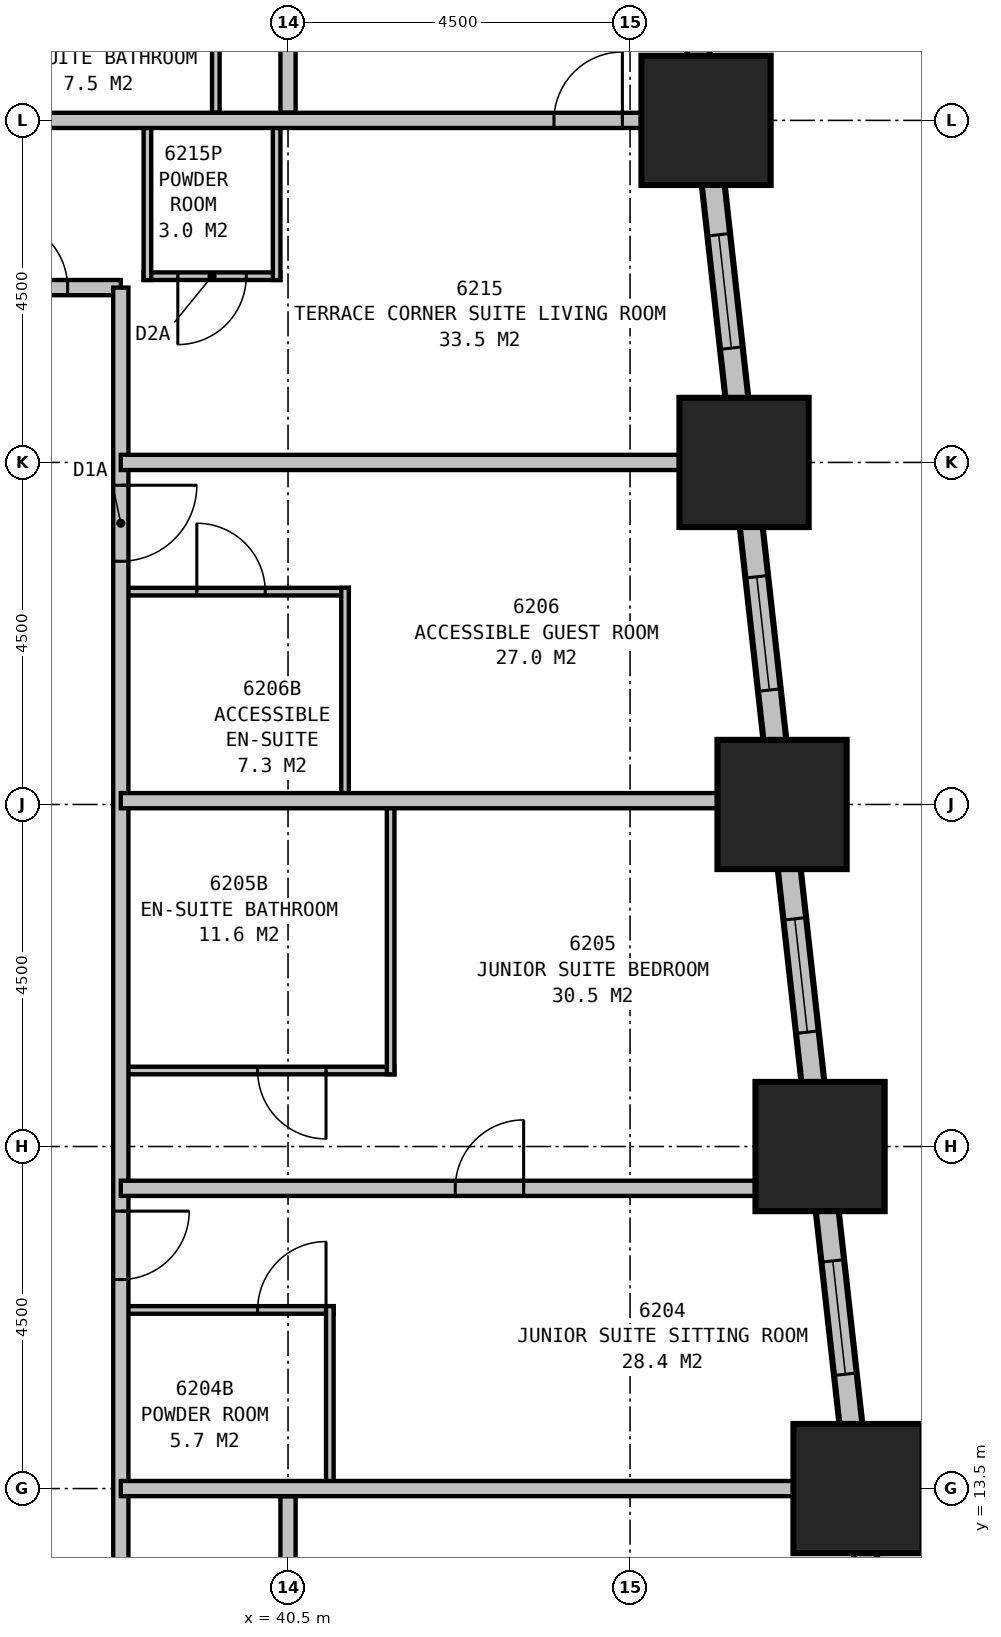
"""IFC4 building model, lengths in metres.
Left out: names, types, materials, properties, quantities, classifications, styles, units other than length and angle.
Written with IfcOpenShell. Run it as: python <this file> out.ifc"""

import sys

from ifc_helpers import new_model, si_unit, direction, frame, frame_2d, origin, origin_2d, place, context, subcontext, project, spatial, rectangle, extrude, element, fill, save


model = new_model("IFC4")
c1 = context("Model", 3, precision=1e-05, world=origin(), true_north=direction((0.0, 1.0)))
c2 = subcontext(c1, "Body", "Model", "MODEL_VIEW")
j1 = project(units=[si_unit("LENGTHUNIT", "METRE"), si_unit("PLANEANGLEUNIT", "RADIAN")], contexts=[c1])
p1 = place(None, origin())
s1 = spatial("IfcSite", under=j1, at=p1, CompositionType="ELEMENT")
p2 = place(p1, origin())
s2 = spatial("IfcBuilding", under=s1, at=p2, CompositionType="ELEMENT")
p3 = place(p2, frame((0.0, 0.0, 240.8)))
s3 = spatial("IfcBuildingStorey", under=s2, at=p3, CompositionType="ELEMENT", Elevation=240.8)
for number, where, z_axis, x_axis in (
    (1, (48.0, 13.5, 0.0), (0.0, 0.0, 1.0), (1.0, 0.0, 0.0)),
    (2, (47.5, 18.0, 0.0), (0.0, 0.0, 1.0), (1.0, 0.0, 0.0)),
    (3, (47.0, 22.5, 0.0), (0.0, 0.0, 1.0), (1.0, 0.0, 0.0)),
    (4, (46.5, 27.0, 0.0), (0.0, 0.0, 1.0), (1.0, 0.0, 0.0)),
    (5, (46.0, 31.5, 0.0), (0.0, 0.0, 1.0), (1.0, 0.0, 0.0)),
):
    element("IfcColumn", number, at=place(p3, frame(where, z_axis=z_axis, x_axis=x_axis)), inside=s3, PredefinedType="COLUMN", context=c2, shape_type="SweptSolid", body=[
        extrude(rectangle(XDim=1.7, YDim=1.7, at=origin_2d()), origin(), (0.0, 0.0, 1.0), 3.9),
    ])
p4 = place(p3, frame((49.017, 4.351, 0.0), z_axis=(0.0, 0.0, 1.0), x_axis=(-0.110433201132, 0.993883548555, 0.0)))
e6 = element("IfcWall", 6, at=p4, inside=s3, PredefinedType="STANDARD", context=c2, shape_type="SweptSolid", body=[
    extrude(rectangle(XDim=31.994, YDim=0.3, at=frame_2d((15.997, 0.0))), origin(), (0.0, 0.0, 1.0), 2.45),
])
p5 = place(p4, frame((1.664, 0.0, 0.5)))
e7 = element("IfcOpeningElement", 7, at=p5, cuts=e6, PredefinedType="OPENING", context=c2, shape_type="SweptSolid", body=[
    extrude(rectangle(XDim=1.5, YDim=1.75, at=frame_2d((0.75, 0.875))), frame((0.0, 0.16, 0.0), z_axis=(0.0, -1.0, 0.0), x_axis=(1.0, 0.0, 0.0)), (0.0, 0.0, 1.0), 0.32),
])
p6 = place(p4, frame((6.192, 0.0, 0.5)))
e8 = element("IfcOpeningElement", 8, at=p6, cuts=e6, PredefinedType="OPENING", context=c2, shape_type="SweptSolid", body=[
    extrude(rectangle(XDim=1.5, YDim=1.75, at=frame_2d((0.75, 0.875))), frame((0.0, 0.16, 0.0), z_axis=(0.0, -1.0, 0.0), x_axis=(1.0, 0.0, 0.0)), (0.0, 0.0, 1.0), 0.32),
])
p7 = place(p4, frame((10.719, 0.0, 0.5)))
e9 = element("IfcOpeningElement", 9, at=p7, cuts=e6, PredefinedType="OPENING", context=c2, shape_type="SweptSolid", body=[
    extrude(rectangle(XDim=1.5, YDim=1.75, at=frame_2d((0.75, 0.875))), frame((0.0, 0.16, 0.0), z_axis=(0.0, -1.0, 0.0), x_axis=(1.0, 0.0, 0.0)), (0.0, 0.0, 1.0), 0.32),
])
p8 = place(p4, frame((15.247, 0.0, 0.5)))
e10 = element("IfcOpeningElement", 10, at=p8, cuts=e6, PredefinedType="OPENING", context=c2, shape_type="SweptSolid", body=[
    extrude(rectangle(XDim=1.5, YDim=1.75, at=frame_2d((0.75, 0.875))), frame((0.0, 0.16, 0.0), z_axis=(0.0, -1.0, 0.0), x_axis=(1.0, 0.0, 0.0)), (0.0, 0.0, 1.0), 0.32),
])
p9 = place(p4, frame((19.775, 0.0, 0.5)))
e11 = element("IfcOpeningElement", 11, at=p9, cuts=e6, PredefinedType="OPENING", context=c2, shape_type="SweptSolid", body=[
    extrude(rectangle(XDim=1.5, YDim=1.75, at=frame_2d((0.75, 0.875))), frame((0.0, 0.16, 0.0), z_axis=(0.0, -1.0, 0.0), x_axis=(1.0, 0.0, 0.0)), (0.0, 0.0, 1.0), 0.32),
])
p10 = place(p4, frame((24.302, 0.0, 0.5)))
e12 = element("IfcOpeningElement", 12, at=p10, cuts=e6, PredefinedType="OPENING", context=c2, shape_type="SweptSolid", body=[
    extrude(rectangle(XDim=1.5, YDim=1.75, at=frame_2d((0.75, 0.875))), frame((0.0, 0.16, 0.0), z_axis=(0.0, -1.0, 0.0), x_axis=(1.0, 0.0, 0.0)), (0.0, 0.0, 1.0), 0.32),
])
p11 = place(p4, frame((28.83, 0.0, 0.5)))
e13 = element("IfcOpeningElement", 13, at=p11, cuts=e6, PredefinedType="OPENING", context=c2, shape_type="SweptSolid", body=[
    extrude(rectangle(XDim=1.5, YDim=1.75, at=frame_2d((0.75, 0.875))), frame((0.0, 0.16, 0.0), z_axis=(0.0, -1.0, 0.0), x_axis=(1.0, 0.0, 0.0)), (0.0, 0.0, 1.0), 0.32),
])
p12 = place(p3, frame((12.406, 29.3, 0.0), z_axis=(0.0, 0.0, 1.0), x_axis=(1.0, 0.0, 0.0)))
e14 = element("IfcWall", 14, at=p12, inside=s3, PredefinedType="PARTITIONING", context=c2, shape_type="SweptSolid", body=[
    extrude(rectangle(XDim=25.894, YDim=0.2, at=frame_2d((12.947, 0.0))), origin(), (0.0, 0.0, 1.0), 3.65),
])
p13 = place(p12, frame((0.9, 0.0, 0.0)))
e15 = element("IfcOpeningElement", 15, at=p13, cuts=e14, PredefinedType="OPENING", context=c2, shape_type="SweptSolid", body=[
    extrude(rectangle(XDim=0.9, YDim=2.1, at=frame_2d((0.45, 1.05))), frame((0.0, 0.11, 0.0), z_axis=(0.0, -1.0, 0.0), x_axis=(1.0, 0.0, 0.0)), (0.0, 0.0, 1.0), 0.22),
])
p14 = place(p12, frame((6.444, 0.0, 0.0)))
e16 = element("IfcOpeningElement", 16, at=p14, cuts=e14, PredefinedType="OPENING", context=c2, shape_type="SweptSolid", body=[
    extrude(rectangle(XDim=0.9, YDim=2.1, at=frame_2d((0.45, 1.05))), frame((0.0, 0.11, 0.0), z_axis=(0.0, -1.0, 0.0), x_axis=(1.0, 0.0, 0.0)), (0.0, 0.0, 1.0), 0.22),
])
p15 = place(p12, frame((14.644, 0.0, 0.0)))
e17 = element("IfcOpeningElement", 17, at=p15, cuts=e14, PredefinedType="OPENING", context=c2, shape_type="SweptSolid", body=[
    extrude(rectangle(XDim=0.9, YDim=2.1, at=frame_2d((0.45, 1.05))), frame((0.0, 0.11, 0.0), z_axis=(0.0, -1.0, 0.0), x_axis=(1.0, 0.0, 0.0)), (0.0, 0.0, 1.0), 0.22),
])
p16 = place(p12, frame((24.293, 0.0, 0.0)))
e18 = element("IfcOpeningElement", 18, at=p16, cuts=e14, PredefinedType="OPENING", context=c2, shape_type="SweptSolid", body=[
    extrude(rectangle(XDim=0.9, YDim=2.1, at=frame_2d((0.45, 1.05))), frame((0.0, 0.11, 0.0), z_axis=(0.0, -1.0, 0.0), x_axis=(1.0, 0.0, 0.0)), (0.0, 0.0, 1.0), 0.22),
])
p17 = place(p3, frame((38.3, 10.6, 0.0), z_axis=(0.0, 0.0, 1.0), x_axis=(0.0, 1.0, 0.0)))
e19 = element("IfcWall", 19, at=p17, inside=s3, PredefinedType="PARTITIONING", context=c2, shape_type="SweptSolid", body=[
    extrude(rectangle(XDim=18.7, YDim=0.2, at=frame_2d((9.35, 0.0))), origin(), (0.0, 0.0, 1.0), 3.65),
])
p18 = place(p17, frame((6.55, 0.0, 0.0), z_axis=(0.0, 0.0, 1.0), x_axis=(-1.0, 0.0, 0.0)))
e20 = element("IfcOpeningElement", 20, at=p18, cuts=e19, PredefinedType="OPENING", context=c2, shape_type="SweptSolid", body=[
    extrude(rectangle(XDim=0.9, YDim=2.1, at=frame_2d((0.45, 1.05))), frame((0.0, 0.11, 0.0), z_axis=(0.0, -1.0, 0.0), x_axis=(1.0, 0.0, 0.0)), (0.0, 0.0, 1.0), 0.22),
])
p19 = place(p17, frame((16.1, 0.0, 0.0), z_axis=(0.0, 0.0, 1.0), x_axis=(-1.0, 0.0, 0.0)))
e21 = element("IfcOpeningElement", 21, at=p19, cuts=e19, PredefinedType="OPENING", context=c2, shape_type="SweptSolid", body=[
    extrude(rectangle(XDim=1.0, YDim=2.1, at=frame_2d((0.5, 1.05))), frame((0.0, 0.11, 0.0), z_axis=(0.0, -1.0, 0.0), x_axis=(1.0, 0.0, 0.0)), (0.0, 0.0, 1.0), 0.22),
])
p20 = place(p3, frame((38.3, 17.45, 0.0), z_axis=(0.0, 0.0, 1.0), x_axis=(1.0, 0.0, 0.0)))
e22 = element("IfcWall", 22, at=p20, inside=s3, PredefinedType="PARTITIONING", context=c2, shape_type="SweptSolid", body=[
    extrude(rectangle(XDim=9.26, YDim=0.2, at=frame_2d((4.63, 0.0))), origin(), (0.0, 0.0, 1.0), 3.65),
])
p21 = place(p20, frame((4.4, 0.0, 0.0)))
e23 = element("IfcOpeningElement", 23, at=p21, cuts=e22, PredefinedType="OPENING", context=c2, shape_type="SweptSolid", body=[
    extrude(rectangle(XDim=0.9, YDim=2.1, at=frame_2d((0.45, 1.05))), frame((0.0, 0.11, 0.0), z_axis=(0.0, -1.0, 0.0), x_axis=(1.0, 0.0, 0.0)), (0.0, 0.0, 1.0), 0.22),
])
p22 = place(p3, frame((38.3, 22.55, 0.0), z_axis=(0.0, 0.0, 1.0), x_axis=(1.0, 0.0, 0.0)))
e24 = element("IfcWall", 24, at=p22, inside=s3, PredefinedType="PARTITIONING", context=c2, shape_type="SweptSolid", body=[
    extrude(rectangle(XDim=8.693, YDim=0.2, at=frame_2d((4.347, 0.0))), origin(), (0.0, 0.0, 1.0), 2.6),
])
p23 = place(p3, frame((41.05, 13.5, 0.0), z_axis=(0.0, 0.0, 1.0), x_axis=(0.0, 1.0, 0.0)))
e25 = element("IfcWall", 25, at=p23, inside=s3, PredefinedType="PLUMBINGWALL", context=c2, shape_type="SweptSolid", body=[
    extrude(rectangle(XDim=2.4, YDim=0.1, at=frame_2d((1.2, 0.0))), origin(), (0.0, 0.0, 1.0), 3.65),
])
p24 = place(p3, frame((38.3, 15.85, 0.0), z_axis=(0.0, 0.0, 1.0), x_axis=(1.0, 0.0, 0.0)))
e26 = element("IfcWall", 26, at=p24, inside=s3, PredefinedType="PLUMBINGWALL", context=c2, shape_type="SweptSolid", body=[
    extrude(rectangle(XDim=2.8, YDim=0.1, at=frame_2d((1.4, 0.0))), origin(), (0.0, 0.0, 1.0), 3.65),
])
p25 = place(p24, frame((1.8, 0.0, 0.0)))
e27 = element("IfcOpeningElement", 27, at=p25, cuts=e26, PredefinedType="OPENING", context=c2, shape_type="SweptSolid", body=[
    extrude(rectangle(XDim=0.9, YDim=2.1, at=frame_2d((0.45, 1.05))), frame((0.0, 0.06, 0.0), z_axis=(0.0, -1.0, 0.0), x_axis=(1.0, 0.0, 0.0)), (0.0, 0.0, 1.0), 0.12),
])
p26 = place(p3, frame((41.85, 18.95, 0.0), z_axis=(0.0, 0.0, 1.0), x_axis=(0.0, 1.0, 0.0)))
e28 = element("IfcWall", 28, at=p26, inside=s3, PredefinedType="PLUMBINGWALL", context=c2, shape_type="SweptSolid", body=[
    extrude(rectangle(XDim=3.6, YDim=0.1, at=frame_2d((1.8, 0.0))), origin(), (0.0, 0.0, 1.0), 3.65),
])
p27 = place(p3, frame((38.3, 19.0, 0.0), z_axis=(0.0, 0.0, 1.0), x_axis=(1.0, 0.0, 0.0)))
e29 = element("IfcWall", 29, at=p27, inside=s3, PredefinedType="PLUMBINGWALL", context=c2, shape_type="SweptSolid", body=[
    extrude(rectangle(XDim=3.6, YDim=0.1, at=frame_2d((1.8, 0.0))), origin(), (0.0, 0.0, 1.0), 3.65),
])
p28 = place(p27, frame((2.7, 0.0, 0.0), z_axis=(0.0, 0.0, 1.0), x_axis=(-1.0, 0.0, 0.0)))
e30 = element("IfcOpeningElement", 30, at=p28, cuts=e29, PredefinedType="OPENING", context=c2, shape_type="SweptSolid", body=[
    extrude(rectangle(XDim=0.9, YDim=2.1, at=frame_2d((0.45, 1.05))), frame((0.0, 0.06, 0.0), z_axis=(0.0, -1.0, 0.0), x_axis=(1.0, 0.0, 0.0)), (0.0, 0.0, 1.0), 0.12),
])
p29 = place(p3, frame((41.25, 22.55, 0.0), z_axis=(0.0, 0.0, 1.0), x_axis=(0.0, 1.0, 0.0)))
e31 = element("IfcWall", 31, at=p29, inside=s3, PredefinedType="PLUMBINGWALL", context=c2, shape_type="SweptSolid", body=[
    extrude(rectangle(XDim=2.8, YDim=0.1, at=frame_2d((1.4, 0.0))), origin(), (0.0, 0.0, 1.0), 3.65),
])
p30 = place(p3, frame((38.3, 25.3, 0.0), z_axis=(0.0, 0.0, 1.0), x_axis=(1.0, 0.0, 0.0)))
e32 = element("IfcWall", 32, at=p30, inside=s3, PredefinedType="PLUMBINGWALL", context=c2, shape_type="SweptSolid", body=[
    extrude(rectangle(XDim=3.0, YDim=0.1, at=frame_2d((1.5, 0.0))), origin(), (0.0, 0.0, 1.0), 3.65),
])
p31 = place(p30, frame((1.0, 0.0, 0.0)))
e33 = element("IfcOpeningElement", 33, at=p31, cuts=e32, PredefinedType="OPENING", context=c2, shape_type="SweptSolid", body=[
    extrude(rectangle(XDim=0.9, YDim=2.1, at=frame_2d((0.45, 1.05))), frame((0.0, 0.06, 0.0), z_axis=(0.0, -1.0, 0.0), x_axis=(1.0, 0.0, 0.0)), (0.0, 0.0, 1.0), 0.12),
])
p32 = place(p3, frame((38.3, 13.5, 0.0), z_axis=(0.0, 0.0, 1.0), x_axis=(1.0, 0.0, 0.0)))
e34 = element("IfcWall", 34, at=p32, inside=s3, PredefinedType="PARTITIONING", context=c2, shape_type="SweptSolid", body=[
    extrude(rectangle(XDim=9.921, YDim=0.2, at=frame_2d((4.96, 0.0))), origin(), (0.0, 0.0, 1.0), 2.3),
])
p33 = place(p3, frame((40.5, 4.6, 0.0), z_axis=(0.0, 0.0, 1.0), x_axis=(0.0, 1.0, 0.0)))
e35 = element("IfcWall", 35, at=p33, inside=s3, PredefinedType="PARTITIONING", context=c2, shape_type="SweptSolid", body=[
    extrude(rectangle(XDim=8.8, YDim=0.2, at=frame_2d((4.4, 0.0))), origin(), (0.0, 0.0, 1.0), 2.6),
])
p34 = place(p33, frame((4.05, 0.0, 0.0)))
e36 = element("IfcOpeningElement", 36, at=p34, cuts=e35, PredefinedType="OPENING", context=c2, shape_type="SweptSolid", body=[
    extrude(rectangle(XDim=0.9, YDim=2.1, at=frame_2d((0.45, 1.05))), frame((0.0, 0.11, 0.0), z_axis=(0.0, -1.0, 0.0), x_axis=(1.0, 0.0, 0.0)), (0.0, 0.0, 1.0), 0.22),
])
p35 = place(p3, frame((38.3, 27.0, 0.0), z_axis=(0.0, 0.0, 1.0), x_axis=(1.0, 0.0, 0.0)))
e37 = element("IfcWall", 37, at=p35, inside=s3, PredefinedType="PARTITIONING", context=c2, shape_type="SweptSolid", body=[
    extrude(rectangle(XDim=7.977, YDim=0.2, at=frame_2d((3.988, 0.0))), origin(), (0.0, 0.0, 1.0), 2.3),
])
p36 = place(p3, frame((35.9, 31.5, 0.0), z_axis=(0.0, 0.0, 1.0), x_axis=(1.0, 0.0, 0.0)))
e38 = element("IfcWall", 38, at=p36, inside=s3, PredefinedType="PARTITIONING", context=c2, shape_type="SweptSolid", body=[
    extrude(rectangle(XDim=10.099, YDim=0.2, at=frame_2d((5.05, 0.0))), origin(), (0.0, 0.0, 1.0), 3.65),
])
p37 = place(p36, frame((8.099, 0.0, 0.0)))
e39 = element("IfcOpeningElement", 39, at=p37, cuts=e38, PredefinedType="OPENING", context=c2, shape_type="SweptSolid", body=[
    extrude(rectangle(XDim=0.9, YDim=2.1, at=frame_2d((0.45, 1.05))), frame((0.0, 0.11, 0.0), z_axis=(0.0, -1.0, 0.0), x_axis=(1.0, 0.0, 0.0)), (0.0, 0.0, 1.0), 0.22),
])
p38 = place(p3, frame((40.35, 31.4, 0.0), z_axis=(0.0, 0.0, 1.0), x_axis=(0.0, -1.0, 0.0)))
e40 = element("IfcWall", 40, at=p38, inside=s3, PredefinedType="PLUMBINGWALL", context=c2, shape_type="SweptSolid", body=[
    extrude(rectangle(XDim=2.0, YDim=0.1, at=frame_2d((1.0, 0.0))), origin(), (0.0, 0.0, 1.0), 2.6),
])
p39 = place(p3, frame((38.65, 31.4, 0.0), z_axis=(0.0, 0.0, 1.0), x_axis=(0.0, -1.0, 0.0)))
e41 = element("IfcWall", 41, at=p39, inside=s3, PredefinedType="PLUMBINGWALL", context=c2, shape_type="SweptSolid", body=[
    extrude(rectangle(XDim=2.0, YDim=0.1, at=frame_2d((1.0, 0.0))), origin(), (0.0, 0.0, 1.0), 3.65),
])
p40 = place(p3, frame((38.6, 29.45, 0.0), z_axis=(0.0, 0.0, 1.0), x_axis=(1.0, 0.0, 0.0)))
e42 = element("IfcWall", 42, at=p40, inside=s3, PredefinedType="PLUMBINGWALL", context=c2, shape_type="SweptSolid", body=[
    extrude(rectangle(XDim=1.8, YDim=0.1, at=frame_2d((0.9, 0.0))), origin(), (0.0, 0.0, 1.0), 3.65),
])
p41 = place(p40, frame((1.35, 0.0, 0.0), z_axis=(0.0, 0.0, 1.0), x_axis=(-1.0, 0.0, 0.0)))
e43 = element("IfcOpeningElement", 43, at=p41, cuts=e42, PredefinedType="OPENING", context=c2, shape_type="SweptSolid", body=[
    extrude(rectangle(XDim=0.9, YDim=2.1, at=frame_2d((0.45, 1.05))), frame((0.0, 0.06, 0.0), z_axis=(0.0, -1.0, 0.0), x_axis=(1.0, 0.0, 0.0)), (0.0, 0.0, 1.0), 0.12),
])
p42 = place(p3, frame((40.5, 31.6, 0.0), z_axis=(0.0, 0.0, 1.0), x_axis=(0.0, 1.0, 0.0)))
e44 = element("IfcWall", 44, at=p42, inside=s3, PredefinedType="PARTITIONING", context=c2, shape_type="SweptSolid", body=[
    extrude(rectangle(XDim=4.4, YDim=0.2, at=frame_2d((2.2, 0.0))), origin(), (0.0, 0.0, 1.0), 2.6),
])
p43 = place(p42, frame((2.5, 0.0, 0.0)))
e45 = element("IfcOpeningElement", 45, at=p43, cuts=e44, PredefinedType="OPENING", context=c2, shape_type="SweptSolid", body=[
    extrude(rectangle(XDim=0.9, YDim=2.1, at=frame_2d((0.45, 1.05))), frame((0.0, 0.11, 0.0), z_axis=(0.0, -1.0, 0.0), x_axis=(1.0, 0.0, 0.0)), (0.0, 0.0, 1.0), 0.22),
])
p44 = place(p3, frame((39.55, 31.6, 0.0), z_axis=(0.0, 0.0, 1.0), x_axis=(0.0, 1.0, 0.0)))
e46 = element("IfcWall", 46, at=p44, inside=s3, PredefinedType="PLUMBINGWALL", context=c2, shape_type="SweptSolid", body=[
    extrude(rectangle(XDim=2.3, YDim=0.1, at=frame_2d((1.15, 0.0))), origin(), (0.0, 0.0, 1.0), 3.65),
])
p45 = place(p7, origin())
e47 = element("IfcWindow", 47, at=p45, inside=s3, PartitioningType="SINGLE_PANEL", PredefinedType="WINDOW", context=c2, shape_type="SweptSolid", body=[
    extrude(rectangle(XDim=1.5, YDim=1.75, at=frame_2d((0.75, 0.875))), frame((0.0, 0.03, 0.0), z_axis=(0.0, -1.0, 0.0), x_axis=(1.0, 0.0, 0.0)), (0.0, 0.0, 1.0), 0.06),
])
fill(e9, e47)
p46 = place(p8, origin())
e48 = element("IfcWindow", 48, at=p46, inside=s3, PartitioningType="SINGLE_PANEL", PredefinedType="WINDOW", context=c2, shape_type="SweptSolid", body=[
    extrude(rectangle(XDim=1.5, YDim=1.75, at=frame_2d((0.75, 0.875))), frame((0.0, 0.03, 0.0), z_axis=(0.0, -1.0, 0.0), x_axis=(1.0, 0.0, 0.0)), (0.0, 0.0, 1.0), 0.06),
])
fill(e10, e48)
p47 = place(p9, origin())
e49 = element("IfcWindow", 49, at=p47, inside=s3, PartitioningType="SINGLE_PANEL", PredefinedType="WINDOW", context=c2, shape_type="SweptSolid", body=[
    extrude(rectangle(XDim=1.5, YDim=1.75, at=frame_2d((0.75, 0.875))), frame((0.0, 0.03, 0.0), z_axis=(0.0, -1.0, 0.0), x_axis=(1.0, 0.0, 0.0)), (0.0, 0.0, 1.0), 0.06),
])
fill(e11, e49)
p48 = place(p10, origin())
e50 = element("IfcWindow", 50, at=p48, inside=s3, PartitioningType="SINGLE_PANEL", PredefinedType="WINDOW", context=c2, shape_type="SweptSolid", body=[
    extrude(rectangle(XDim=1.5, YDim=1.75, at=frame_2d((0.75, 0.875))), frame((0.0, 0.03, 0.0), z_axis=(0.0, -1.0, 0.0), x_axis=(1.0, 0.0, 0.0)), (0.0, 0.0, 1.0), 0.06),
])
fill(e12, e50)
p49 = place(p16, origin())
e51 = element("IfcDoor", 51, at=p49, inside=s3, OperationType="SINGLE_SWING_LEFT", PredefinedType="DOOR", context=c2, shape_type="SweptSolid", body=[
    extrude(rectangle(XDim=0.9, YDim=2.1, at=frame_2d((0.45, 1.05))), frame((0.0, 0.025, 0.0), z_axis=(0.0, -1.0, 0.0), x_axis=(1.0, 0.0, 0.0)), (0.0, 0.0, 1.0), 0.05),
])
fill(e18, e51)
p50 = place(p18, origin())
e52 = element("IfcDoor", 52, at=p50, inside=s3, OperationType="SINGLE_SWING_LEFT", PredefinedType="DOOR", context=c2, shape_type="SweptSolid", body=[
    extrude(rectangle(XDim=0.9, YDim=2.1, at=frame_2d((0.45, 1.05))), frame((0.0, 0.025, 0.0), z_axis=(0.0, -1.0, 0.0), x_axis=(1.0, 0.0, 0.0)), (0.0, 0.0, 1.0), 0.05),
])
fill(e20, e52)
p51 = place(p19, origin())
e53 = element("IfcDoor", 53, at=p51, inside=s3, OperationType="SINGLE_SWING_LEFT", PredefinedType="DOOR", context=c2, shape_type="SweptSolid", body=[
    extrude(rectangle(XDim=1.0, YDim=2.1, at=frame_2d((0.5, 1.05))), frame((0.0, 0.025, 0.0), z_axis=(0.0, -1.0, 0.0), x_axis=(1.0, 0.0, 0.0)), (0.0, 0.0, 1.0), 0.05),
])
fill(e21, e53)
p52 = place(p21, origin())
e54 = element("IfcDoor", 54, at=p52, inside=s3, OperationType="SINGLE_SWING_RIGHT", PredefinedType="DOOR", context=c2, shape_type="SweptSolid", body=[
    extrude(rectangle(XDim=0.9, YDim=2.1, at=frame_2d((0.45, 1.05))), frame((0.0, 0.025, 0.0), z_axis=(0.0, -1.0, 0.0), x_axis=(1.0, 0.0, 0.0)), (0.0, 0.0, 1.0), 0.05),
])
fill(e23, e54)
p53 = place(p25, origin())
e55 = element("IfcDoor", 55, at=p53, inside=s3, OperationType="SINGLE_SWING_RIGHT", PredefinedType="DOOR", context=c2, shape_type="SweptSolid", body=[
    extrude(rectangle(XDim=0.9, YDim=2.1, at=frame_2d((0.45, 1.05))), frame((0.0, 0.025, 0.0), z_axis=(0.0, -1.0, 0.0), x_axis=(1.0, 0.0, 0.0)), (0.0, 0.0, 1.0), 0.05),
])
fill(e27, e55)
p54 = place(p28, origin())
e56 = element("IfcDoor", 56, at=p54, inside=s3, OperationType="SINGLE_SWING_LEFT", PredefinedType="DOOR", context=c2, shape_type="SweptSolid", body=[
    extrude(rectangle(XDim=0.9, YDim=2.1, at=frame_2d((0.45, 1.05))), frame((0.0, 0.025, 0.0), z_axis=(0.0, -1.0, 0.0), x_axis=(1.0, 0.0, 0.0)), (0.0, 0.0, 1.0), 0.05),
])
fill(e30, e56)
p55 = place(p31, origin())
e57 = element("IfcDoor", 57, at=p55, inside=s3, OperationType="SINGLE_SWING_LEFT", PredefinedType="DOOR", context=c2, shape_type="SweptSolid", body=[
    extrude(rectangle(XDim=0.9, YDim=2.1, at=frame_2d((0.45, 1.05))), frame((0.0, 0.025, 0.0), z_axis=(0.0, -1.0, 0.0), x_axis=(1.0, 0.0, 0.0)), (0.0, 0.0, 1.0), 0.05),
])
fill(e33, e57)
p56 = place(p37, origin())
e58 = element("IfcDoor", 58, at=p56, inside=s3, OperationType="SINGLE_SWING_RIGHT", PredefinedType="DOOR", context=c2, shape_type="SweptSolid", body=[
    extrude(rectangle(XDim=0.9, YDim=2.1, at=frame_2d((0.45, 1.05))), frame((0.0, 0.025, 0.0), z_axis=(0.0, -1.0, 0.0), x_axis=(1.0, 0.0, 0.0)), (0.0, 0.0, 1.0), 0.05),
])
fill(e39, e58)
p57 = place(p41, origin())
e59 = element("IfcDoor", 59, at=p57, inside=s3, OperationType="SINGLE_SWING_RIGHT", PredefinedType="DOOR", context=c2, shape_type="SweptSolid", body=[
    extrude(rectangle(XDim=0.9, YDim=2.1, at=frame_2d((0.45, 1.05))), frame((0.0, 0.025, 0.0), z_axis=(0.0, -1.0, 0.0), x_axis=(1.0, 0.0, 0.0)), (0.0, 0.0, 1.0), 0.05),
])
fill(e43, e59)
save(model, sys.argv[1])
